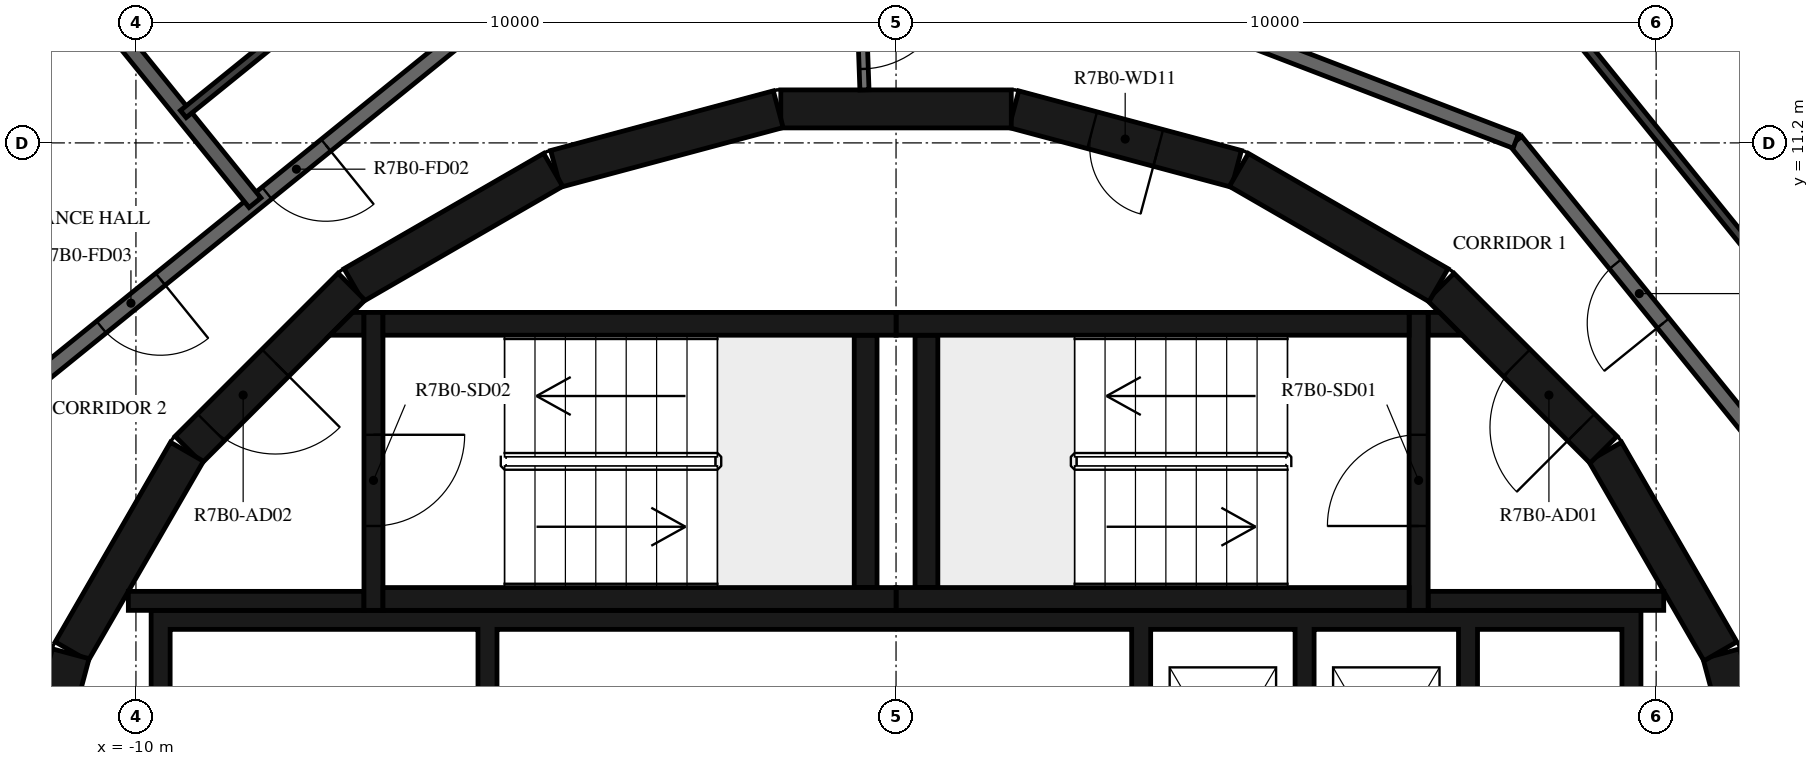
"""IFC4 building model, lengths in metres.
Left out: names, types, materials, properties, quantities, classifications, styles, units other than length and angle.
Written with IfcOpenShell. Run it as: python <this file> out.ifc"""

import sys

from ifc_helpers import new_model, si_unit, direction, frame, frame_2d, origin, place, context, subcontext, project, spatial, polyline, rectangle, outline, extrude, element, fill, save


model = new_model("IFC4")
c1 = context("Model", 3, precision=1e-05, world=origin(), true_north=direction((0.0, 1.0)))
c2 = subcontext(c1, "Body", "Model", "MODEL_VIEW")
j1 = project(units=[si_unit("LENGTHUNIT", "METRE"), si_unit("PLANEANGLEUNIT", "RADIAN")], contexts=[c1])
p1 = place(None, origin())
s1 = spatial("IfcSite", under=j1, at=p1, CompositionType="ELEMENT")
p2 = place(p1, origin())
s2 = spatial("IfcBuilding", under=s1, at=p2, CompositionType="ELEMENT")
p3 = place(p2, frame((0.0, 0.0, 277.4)))
s3 = spatial("IfcBuildingStorey", under=s2, at=p3, CompositionType="ELEMENT", Elevation=277.4)
for number, where, z_axis, x_axis in (
    (1, (11.643, 1.55, 0.0), (0.0, 0.0, 1.0), (-0.259, 0.966, 0.0)),
    (2, (10.845, 4.51, 0.0), (0.0, 0.0, 1.0), (-0.5, 0.866, 0.0)),
):
    element("IfcWall", number, at=place(p3, frame(where, z_axis=z_axis, x_axis=x_axis)), inside=s3, PredefinedType="SHEAR", context=c2, shape_type="SweptSolid", body=[
        extrude(rectangle(XDim=3.033, YDim=0.5, at=frame_2d((1.516, 0.0))), origin(), (0.0, 0.0, 1.0), 3.12),
    ])
p4 = place(p3, frame((9.308, 7.164, 0.0), z_axis=(0.0, 0.0, 1.0), x_axis=(-0.707106781187, 0.707106781187, 0.0)))
e3 = element("IfcWall", 3, at=p4, inside=s3, PredefinedType="SHEAR", context=c2, shape_type="SweptSolid", body=[
    extrude(rectangle(XDim=3.032, YDim=0.5, at=frame_2d((1.516, 0.0))), origin(), (0.0, 0.0, 1.0), 3.12),
])
p5 = place(p4, frame((0.416, 0.0, 0.0)))
e4 = element("IfcOpeningElement", 4, at=p5, cuts=e3, PredefinedType="OPENING", context=c2, shape_type="SweptSolid", body=[
    extrude(rectangle(XDim=1.2, YDim=2.1, at=frame_2d((0.6, 1.05))), frame((0.0, 0.26, 0.0), z_axis=(0.0, -1.0, 0.0), x_axis=(1.0, 0.0, 0.0)), (0.0, 0.0, 1.0), 0.52),
])
p6 = place(p3, frame((7.137, 9.329, 0.0), z_axis=(0.0, 0.0, 1.0), x_axis=(-0.865975092491, 0.500087131594, 0.0)))
e5 = element("IfcWall", 5, at=p6, inside=s3, PredefinedType="SHEAR", context=c2, shape_type="SweptSolid", body=[
    extrude(rectangle(XDim=3.033, YDim=0.5, at=frame_2d((1.516, 0.0))), origin(), (0.0, 0.0, 1.0), 3.12),
])
p7 = place(p3, frame((4.479, 10.858, 0.0), z_axis=(0.0, 0.0, 1.0), x_axis=(-0.965948410781, 0.258734743916, 0.0)))
e6 = element("IfcWall", 6, at=p7, inside=s3, PredefinedType="SHEAR", context=c2, shape_type="SweptSolid", body=[
    extrude(rectangle(XDim=3.033, YDim=0.5, at=frame_2d((1.516, 0.0))), origin(), (0.0, 0.0, 1.0), 3.12),
])
p8 = place(p7, frame((1.066, 0.0, 0.0)))
e7 = element("IfcOpeningElement", 7, at=p8, cuts=e6, PredefinedType="OPENING", context=c2, shape_type="SweptSolid", body=[
    extrude(rectangle(XDim=0.9, YDim=2.1, at=frame_2d((0.45, 1.05))), frame((0.0, 0.26, 0.0), z_axis=(0.0, -1.0, 0.0), x_axis=(1.0, 0.0, 0.0)), (0.0, 0.0, 1.0), 0.52),
])
for number, where, z_axis, x_axis in (
    (8, (1.516, 11.647, 0.0), (0.0, 0.0, 1.0), (-1.0, 0.0, 0.0)),
    (9, (-1.55, 11.643, 0.0), (0.0, 0.0, 1.0), (-0.966, -0.259, 0.0)),
    (10, (-4.51, 10.845, 0.0), (0.0, 0.0, 1.0), (-0.866, -0.5, 0.0)),
):
    element("IfcWall", number, at=place(p3, frame(where, z_axis=z_axis, x_axis=x_axis)), inside=s3, PredefinedType="SHEAR", context=c2, shape_type="SweptSolid", body=[
        extrude(rectangle(XDim=3.033, YDim=0.5, at=frame_2d((1.516, 0.0))), origin(), (0.0, 0.0, 1.0), 3.12),
    ])
p9 = place(p3, frame((-7.164, 9.308, 0.0), z_axis=(0.0, 0.0, 1.0), x_axis=(-0.707106781187, -0.707106781187, 0.0)))
e11 = element("IfcWall", 11, at=p9, inside=s3, PredefinedType="SHEAR", context=c2, shape_type="SweptSolid", body=[
    extrude(rectangle(XDim=3.032, YDim=0.5, at=frame_2d((1.516, 0.0))), origin(), (0.0, 0.0, 1.0), 3.12),
])
p10 = place(p9, frame((1.416, 0.0, 0.0)))
e12 = element("IfcOpeningElement", 12, at=p10, cuts=e11, PredefinedType="OPENING", context=c2, shape_type="SweptSolid", body=[
    extrude(rectangle(XDim=1.2, YDim=2.1, at=frame_2d((0.6, 1.05))), frame((0.0, 0.26, 0.0), z_axis=(0.0, -1.0, 0.0), x_axis=(1.0, 0.0, 0.0)), (0.0, 0.0, 1.0), 0.52),
])
for number, where, z_axis, x_axis in (
    (13, (-9.329, 7.137, 0.0), (0.0, 0.0, 1.0), (-0.5, -0.866, 0.0)),
    (14, (-10.858, 4.479, 0.0), (0.0, 0.0, 1.0), (-0.259, -0.966, 0.0)),
):
    element("IfcWall", number, at=place(p3, frame(where, z_axis=z_axis, x_axis=x_axis)), inside=s3, PredefinedType="SHEAR", context=c2, shape_type="SweptSolid", body=[
        extrude(rectangle(XDim=3.033, YDim=0.5, at=frame_2d((1.516, 0.0))), origin(), (0.0, 0.0, 1.0), 3.12),
    ])
for number, where, z_axis, x_axis in (
    (15, (0.0, 5.2, 0.0), (0.0, 0.0, 1.0), (1.0, 0.0, 0.0)),
    (16, (0.0, 8.82, 0.0), (0.0, 0.0, 1.0), (1.0, 0.0, 0.0)),
):
    element("IfcWall", number, at=place(p3, frame(where, z_axis=z_axis, x_axis=x_axis)), inside=s3, PredefinedType="SHEAR", context=c2, shape_type="SweptSolid", body=[
        extrude(rectangle(XDim=6.75, YDim=0.3, at=frame_2d((3.375, 0.0))), origin(), (0.0, 0.0, 1.0), 3.12),
    ])
p11 = place(p3, frame((0.4, 5.35, 0.0), z_axis=(0.0, 0.0, 1.0), x_axis=(0.0, 1.0, 0.0)))
e17 = element("IfcWall", 17, at=p11, inside=s3, PredefinedType="SHEAR", context=c2, shape_type="SweptSolid", body=[
    extrude(rectangle(XDim=3.32, YDim=0.3, at=frame_2d((1.66, 0.0))), origin(), (0.0, 0.0, 1.0), 3.12),
])
p12 = place(p3, frame((6.875, 5.05, 0.0), z_axis=(0.0, 0.0, 1.0), x_axis=(0.0, 1.0, 0.0)))
e18 = element("IfcWall", 18, at=p12, inside=s3, PredefinedType="SHEAR", context=c2, shape_type="SweptSolid", body=[
    extrude(rectangle(XDim=3.92, YDim=0.25, at=frame_2d((1.96, 0.0))), origin(), (0.0, 0.0, 1.0), 3.12),
])
p13 = place(p12, frame((1.11, 0.0, 0.0)))
e19 = element("IfcOpeningElement", 19, at=p13, cuts=e18, PredefinedType="OPENING", context=c2, shape_type="SweptSolid", body=[
    extrude(rectangle(XDim=1.2, YDim=2.1, at=frame_2d((0.6, 1.05))), frame((0.0, 0.135, 0.0), z_axis=(0.0, -1.0, 0.0), x_axis=(1.0, 0.0, 0.0)), (0.0, 0.0, 1.0), 0.27),
])
p14 = place(p3, frame((7.0, 5.175, 0.0), z_axis=(0.0, 0.0, 1.0), x_axis=(1.0, 0.0, 0.0)))
e20 = element("IfcWall", 20, at=p14, inside=s3, PredefinedType="SHEAR", context=c2, shape_type="SweptSolid", body=[
    extrude(rectangle(XDim=3.1, YDim=0.25, at=frame_2d((1.55, 0.0))), origin(), (0.0, 0.0, 1.0), 3.12),
])
p15 = place(p3, origin())
e21 = element("IfcWall", 21, at=p15, inside=s3, PredefinedType="SHEAR", context=c2, shape_type="SweptSolid", body=[
    extrude(outline(polyline([(7.448, 8.67), (7.0, 8.67), (7.0, 8.97), (7.148, 8.97), (7.448, 8.67)])), origin(), (0.0, 0.0, 1.0), 3.12),
])
for number, where, z_axis, x_axis in (
    (22, (-6.75, 5.2, 0.0), (0.0, 0.0, 1.0), (1.0, 0.0, 0.0)),
    (23, (-6.75, 8.82, 0.0), (0.0, 0.0, 1.0), (1.0, 0.0, 0.0)),
):
    element("IfcWall", number, at=place(p3, frame(where, z_axis=z_axis, x_axis=x_axis)), inside=s3, PredefinedType="SHEAR", context=c2, shape_type="SweptSolid", body=[
        extrude(rectangle(XDim=6.75, YDim=0.3, at=frame_2d((3.375, 0.0))), origin(), (0.0, 0.0, 1.0), 3.12),
    ])
p16 = place(p3, frame((-0.4, 5.35, 0.0), z_axis=(0.0, 0.0, 1.0), x_axis=(0.0, 1.0, 0.0)))
e24 = element("IfcWall", 24, at=p16, inside=s3, PredefinedType="SHEAR", context=c2, shape_type="SweptSolid", body=[
    extrude(rectangle(XDim=3.32, YDim=0.3, at=frame_2d((1.66, 0.0))), origin(), (0.0, 0.0, 1.0), 3.12),
])
p17 = place(p3, frame((-6.875, 8.97, 0.0), z_axis=(0.0, 0.0, 1.0), x_axis=(0.0, -1.0, 0.0)))
e25 = element("IfcWall", 25, at=p17, inside=s3, PredefinedType="SHEAR", context=c2, shape_type="SweptSolid", body=[
    extrude(rectangle(XDim=3.92, YDim=0.25, at=frame_2d((1.96, 0.0))), origin(), (0.0, 0.0, 1.0), 3.12),
])
p18 = place(p17, frame((1.61, 0.0, 0.0)))
e26 = element("IfcOpeningElement", 26, at=p18, cuts=e25, PredefinedType="OPENING", context=c2, shape_type="SweptSolid", body=[
    extrude(rectangle(XDim=1.2, YDim=2.1, at=frame_2d((0.6, 1.05))), frame((0.0, 0.135, 0.0), z_axis=(0.0, -1.0, 0.0), x_axis=(1.0, 0.0, 0.0)), (0.0, 0.0, 1.0), 0.27),
])
p19 = place(p3, frame((-7.0, 5.175, 0.0), z_axis=(0.0, 0.0, 1.0), x_axis=(-1.0, 0.0, 0.0)))
e27 = element("IfcWall", 27, at=p19, inside=s3, PredefinedType="SHEAR", context=c2, shape_type="SweptSolid", body=[
    extrude(rectangle(XDim=3.1, YDim=0.25, at=frame_2d((1.55, 0.0))), origin(), (0.0, 0.0, 1.0), 3.12),
])
p20 = place(p3, origin())
e28 = element("IfcWall", 28, at=p20, inside=s3, PredefinedType="SHEAR", context=c2, shape_type="SweptSolid", body=[
    extrude(outline(polyline([(-7.148, 8.97), (-7.0, 8.97), (-7.0, 8.67), (-7.448, 8.67), (-7.148, 8.97)])), origin(), (0.0, 0.0, 1.0), 3.12),
])
p21 = place(p3, origin())
e29 = element("IfcWall", 29, at=p21, inside=s3, PredefinedType="SHEAR", context=c2, shape_type="SweptSolid", body=[
    extrude(outline(polyline([(-9.8, 1.9), (-9.55, 1.9), (-9.55, 4.8), (-5.5, 4.8), (-5.5, 1.9), (-5.25, 1.9), (-5.25, 4.8), (3.1, 4.8), (3.1, 1.9), (3.35, 1.9), (3.35, 4.8), (5.25, 4.8), (5.25, 1.9), (5.5, 1.9), (5.5, 4.8), (7.4, 4.8), (7.4, 1.9), (7.65, 1.9), (7.65, 4.8), (9.55, 4.8), (9.55, 1.9), (9.8, 1.9), (9.8, 4.8), (9.8, 5.05), (-9.8, 5.05), (-9.8, 4.8), (-9.8, 1.9)])), origin(), (0.0, 0.0, 1.0), 3.12),
])
p22 = place(p3, frame((-0.471, 13.492, 0.0), z_axis=(0.0, 0.0, 1.0), x_axis=(0.034873173869, -0.999391745886, 0.0)))
e30 = element("IfcWall", 30, at=p22, inside=s3, PredefinedType="PARTITIONING", context=c2, shape_type="SweptSolid", body=[
    extrude(rectangle(XDim=1.596, YDim=0.12, at=frame_2d((0.798, 0.0))), origin(), (0.0, 0.0, 1.0), 3.12),
])
p23 = place(p22, frame((0.12, 0.0, 0.0)))
e31 = element("IfcOpeningElement", 31, at=p23, cuts=e30, PredefinedType="OPENING", context=c2, shape_type="SweptSolid", body=[
    extrude(rectangle(XDim=1.2, YDim=2.1, at=frame_2d((0.6, 1.05))), frame((0.0, 0.07, 0.0), z_axis=(0.0, -1.0, 0.0), x_axis=(1.0, 0.0, 0.0)), (0.0, 0.0, 1.0), 0.14),
])
p24 = place(p3, frame((12.673, 5.643, 0.0), z_axis=(0.0, 0.0, 1.0), x_axis=(-0.629302871585, 0.777160148113, 0.0)))
e32 = element("IfcWall", 32, at=p24, inside=s3, PredefinedType="STANDARD", context=c2, shape_type="SweptSolid", body=[
    extrude(rectangle(XDim=7.181, YDim=0.2, at=frame_2d((3.59, 0.0))), origin(), (0.0, 0.0, 1.0), 3.12),
])
p25 = place(p24, frame((4.1, 0.0, 0.0)))
e33 = element("IfcOpeningElement", 33, at=p25, cuts=e32, PredefinedType="OPENING", context=c2, shape_type="SweptSolid", body=[
    extrude(rectangle(XDim=1.0, YDim=2.1, at=frame_2d((0.5, 1.05))), frame((0.0, 0.11, 0.0), z_axis=(0.0, -1.0, 0.0), x_axis=(1.0, 0.0, 0.0)), (0.0, 0.0, 1.0), 0.22),
])
p26 = place(p3, frame((8.154, 11.223, 0.0), z_axis=(0.0, 0.0, 1.0), x_axis=(-0.93359073609, 0.358341090983, 0.0)))
e34 = element("IfcWall", 34, at=p26, inside=s3, PredefinedType="STANDARD", context=c2, shape_type="SweptSolid", body=[
    extrude(rectangle(XDim=7.181, YDim=0.2, at=frame_2d((3.59, 0.0))), origin(), (0.0, 0.0, 1.0), 3.12),
])
p27 = place(p3, frame((-5.643, 12.673, 0.0), z_axis=(0.0, 0.0, 1.0), x_axis=(-0.777160148113, -0.629302871585, 0.0)))
e35 = element("IfcWall", 35, at=p27, inside=s3, PredefinedType="STANDARD", context=c2, shape_type="SweptSolid", body=[
    extrude(rectangle(XDim=7.181, YDim=0.2, at=frame_2d((3.59, 0.0))), origin(), (0.0, 0.0, 1.0), 3.12),
])
p28 = place(p27, frame((2.39, 0.0, 0.0)))
e36 = element("IfcOpeningElement", 36, at=p28, cuts=e35, PredefinedType="OPENING", context=c2, shape_type="SweptSolid", body=[
    extrude(rectangle(XDim=1.0, YDim=2.1, at=frame_2d((0.5, 1.05))), frame((0.0, 0.11, 0.0), z_axis=(0.0, -1.0, 0.0), x_axis=(1.0, 0.0, 0.0)), (0.0, 0.0, 1.0), 0.22),
])
p29 = place(p27, frame((5.192, 0.0, 0.0)))
e37 = element("IfcOpeningElement", 37, at=p29, cuts=e35, PredefinedType="OPENING", context=c2, shape_type="SweptSolid", body=[
    extrude(rectangle(XDim=1.0, YDim=2.1, at=frame_2d((0.5, 1.05))), frame((0.0, 0.11, 0.0), z_axis=(0.0, -1.0, 0.0), x_axis=(1.0, 0.0, 0.0)), (0.0, 0.0, 1.0), 0.22),
])
p30 = place(p3, frame((-10.779, 13.31, 0.0), z_axis=(0.0, 0.0, 1.0), x_axis=(0.62931692753, -0.777148766147, 0.0)))
e38 = element("IfcWall", 38, at=p30, inside=s3, PredefinedType="STANDARD", context=c2, shape_type="SweptSolid", body=[
    extrude(rectangle(XDim=3.727, YDim=0.2, at=frame_2d((1.864, 0.0))), origin(), (0.0, 0.0, 1.0), 3.12),
])
p31 = place(p3, frame((14.092, 6.274, 0.0), z_axis=(0.0, 0.0, 1.0), x_axis=(-0.62933367237, 0.777135206268, 0.0)))
e39 = element("IfcWall", 39, at=p31, inside=s3, PredefinedType="PARTITIONING", context=c2, shape_type="SweptSolid", body=[
    extrude(rectangle(XDim=7.985, YDim=0.12, at=frame_2d((3.992, 0.0))), origin(), (0.0, 0.0, 1.0), 3.12),
])
p32 = place(p31, frame((2.073, 0.0, 0.0)))
e40 = element("IfcOpeningElement", 40, at=p32, cuts=e39, PredefinedType="OPENING", context=c2, shape_type="SweptSolid", body=[
    extrude(rectangle(XDim=0.9, YDim=2.1, at=frame_2d((0.45, 1.05))), frame((0.0, 0.07, 0.0), z_axis=(0.0, -1.0, 0.0), x_axis=(1.0, 0.0, 0.0)), (0.0, 0.0, 1.0), 0.14),
])
p33 = place(p3, frame((-6.274, 14.092, 0.0), z_axis=(0.0, 0.0, 1.0), x_axis=(-0.777162268892, -0.629300252511, 0.0)))
e41 = element("IfcWall", 41, at=p33, inside=s3, PredefinedType="PARTITIONING", context=c2, shape_type="SweptSolid", body=[
    extrude(rectangle(XDim=3.992, YDim=0.12, at=frame_2d((1.996, 0.0))), origin(), (0.0, 0.0, 1.0), 3.12),
])
p34 = place(p33, frame((0.2, 0.0, 0.0)))
e42 = element("IfcOpeningElement", 42, at=p34, cuts=e41, PredefinedType="OPENING", context=c2, shape_type="SweptSolid", body=[
    extrude(rectangle(XDim=0.9, YDim=2.1, at=frame_2d((0.45, 1.05))), frame((0.0, 0.07, 0.0), z_axis=(0.0, -1.0, 0.0), x_axis=(1.0, 0.0, 0.0)), (0.0, 0.0, 1.0), 0.14),
])
p35 = place(p13, origin())
e43 = element("IfcDoor", 43, at=p35, inside=s3, OperationType="SINGLE_SWING_LEFT", PredefinedType="DOOR", context=c2, shape_type="SweptSolid", body=[
    extrude(rectangle(XDim=1.2, YDim=2.1, at=frame_2d((0.6, 1.05))), frame((0.0, 0.025, 0.0), z_axis=(0.0, -1.0, 0.0), x_axis=(1.0, 0.0, 0.0)), (0.0, 0.0, 1.0), 0.05),
])
fill(e19, e43)
p36 = place(p5, origin())
e44 = element("IfcDoor", 44, at=p36, inside=s3, OperationType="SINGLE_SWING_RIGHT", PredefinedType="DOOR", context=c2, shape_type="SweptSolid", body=[
    extrude(rectangle(XDim=1.2, YDim=2.1, at=frame_2d((0.6, 1.05))), frame((0.0, 0.025, 0.0), z_axis=(0.0, -1.0, 0.0), x_axis=(1.0, 0.0, 0.0)), (0.0, 0.0, 1.0), 0.05),
])
fill(e4, e44)
p37 = place(p18, origin())
e45 = element("IfcDoor", 45, at=p37, inside=s3, OperationType="SINGLE_SWING_LEFT", PredefinedType="DOOR", context=c2, shape_type="SweptSolid", body=[
    extrude(rectangle(XDim=1.2, YDim=2.1, at=frame_2d((0.6, 1.05))), frame((0.0, 0.025, 0.0), z_axis=(0.0, -1.0, 0.0), x_axis=(1.0, 0.0, 0.0)), (0.0, 0.0, 1.0), 0.05),
])
fill(e26, e45)
p38 = place(p10, origin())
e46 = element("IfcDoor", 46, at=p38, inside=s3, OperationType="SINGLE_SWING_RIGHT", PredefinedType="DOOR", context=c2, shape_type="SweptSolid", body=[
    extrude(rectangle(XDim=1.2, YDim=2.1, at=frame_2d((0.6, 1.05))), frame((0.0, 0.025, 0.0), z_axis=(0.0, -1.0, 0.0), x_axis=(1.0, 0.0, 0.0)), (0.0, 0.0, 1.0), 0.05),
])
fill(e12, e46)
p39 = place(p8, origin())
e47 = element("IfcDoor", 47, at=p39, inside=s3, OperationType="SINGLE_SWING_LEFT", PredefinedType="DOOR", context=c2, shape_type="SweptSolid", body=[
    extrude(rectangle(XDim=0.9, YDim=2.1, at=frame_2d((0.45, 1.05))), frame((0.0, 0.025, 0.0), z_axis=(0.0, -1.0, 0.0), x_axis=(1.0, 0.0, 0.0)), (0.0, 0.0, 1.0), 0.05),
])
fill(e7, e47)
p40 = place(p25, origin())
e48 = element("IfcDoor", 48, at=p40, inside=s3, OperationType="SINGLE_SWING_LEFT", PredefinedType="DOOR", context=c2, shape_type="SweptSolid", body=[
    extrude(rectangle(XDim=1.0, YDim=2.1, at=frame_2d((0.5, 1.05))), frame((0.0, 0.025, 0.0), z_axis=(0.0, -1.0, 0.0), x_axis=(1.0, 0.0, 0.0)), (0.0, 0.0, 1.0), 0.05),
])
fill(e33, e48)
p41 = place(p28, origin())
e49 = element("IfcDoor", 49, at=p41, inside=s3, OperationType="SINGLE_SWING_RIGHT", PredefinedType="DOOR", context=c2, shape_type="SweptSolid", body=[
    extrude(rectangle(XDim=1.0, YDim=2.1, at=frame_2d((0.5, 1.05))), frame((0.0, 0.025, 0.0), z_axis=(0.0, -1.0, 0.0), x_axis=(1.0, 0.0, 0.0)), (0.0, 0.0, 1.0), 0.05),
])
fill(e36, e49)
p42 = place(p29, origin())
e50 = element("IfcDoor", 50, at=p42, inside=s3, OperationType="SINGLE_SWING_LEFT", PredefinedType="DOOR", context=c2, shape_type="SweptSolid", body=[
    extrude(rectangle(XDim=1.0, YDim=2.1, at=frame_2d((0.5, 1.05))), frame((0.0, 0.025, 0.0), z_axis=(0.0, -1.0, 0.0), x_axis=(1.0, 0.0, 0.0)), (0.0, 0.0, 1.0), 0.05),
])
fill(e37, e50)
p43 = place(p23, origin())
e51 = element("IfcDoor", 51, at=p43, inside=s3, OperationType="DOUBLE_DOOR_SINGLE_SWING", PredefinedType="DOOR", context=c2, shape_type="SweptSolid", body=[
    extrude(rectangle(XDim=1.2, YDim=2.1, at=frame_2d((0.6, 1.05))), frame((0.0, 0.025, 0.0), z_axis=(0.0, -1.0, 0.0), x_axis=(1.0, 0.0, 0.0)), (0.0, 0.0, 1.0), 0.05),
])
fill(e31, e51)
save(model, sys.argv[1])
